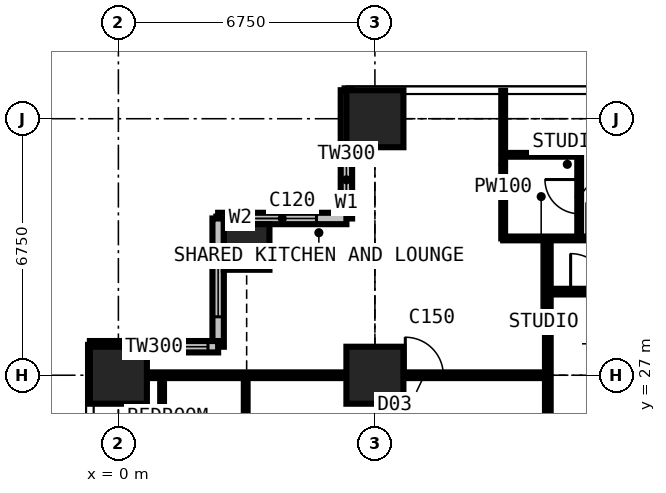
"""IFC4 building model, lengths in metres.
Left out: names, types, materials, properties, quantities, classifications, styles, units other than length and angle.
Written with IfcOpenShell. Run it as: python <this file> out.ifc"""

import sys

from ifc_helpers import new_model, si_unit, direction, frame, frame_2d, origin, origin_2d, place, context, subcontext, project, spatial, rectangle, extrude, element, fill, save


model = new_model("IFC4")
c1 = context("Model", 3, precision=1e-05, world=origin(), true_north=direction((0.0, 1.0)))
c2 = subcontext(c1, "Body", "Model", "MODEL_VIEW")
j1 = project(units=[si_unit("LENGTHUNIT", "METRE"), si_unit("PLANEANGLEUNIT", "RADIAN")], contexts=[c1])
p1 = place(None, origin())
s1 = spatial("IfcSite", under=j1, at=p1, CompositionType="ELEMENT")
p2 = place(p1, origin())
s2 = spatial("IfcBuilding", under=s1, at=p2, CompositionType="ELEMENT")
p3 = place(p2, frame((0.0, 0.0, 153.0)))
s3 = spatial("IfcBuildingStorey", under=s2, at=p3, CompositionType="ELEMENT", Elevation=153.0)
p4 = place(p3, frame((0.0, 27.0, 0.0), z_axis=(0.0, 0.0, 1.0), x_axis=(1.0, 0.0, 0.0)))
e1 = element("IfcColumn", 1, at=p4, inside=s3, PredefinedType="COLUMN", context=c2, shape_type="SweptSolid", body=[
    extrude(rectangle(XDim=1.5, YDim=1.5, at=origin_2d()), origin(), (0.0, 0.0, 1.0), 3.6),
])
p5 = place(p3, frame((3.375, 30.375, 0.0), z_axis=(0.0, 0.0, 1.0), x_axis=(1.0, 0.0, 0.0)))
e2 = element("IfcColumn", 2, at=p5, inside=s3, PredefinedType="COLUMN", context=c2, shape_type="SweptSolid", body=[
    extrude(rectangle(XDim=1.2, YDim=1.2, at=origin_2d()), origin(), (0.0, 0.0, 1.0), 3.6),
])
for number, where, z_axis, x_axis in (
    (3, (6.75, 27.0, 0.0), (0.0, 0.0, 1.0), (1.0, 0.0, 0.0)),
    (4, (6.75, 33.75, 0.0), (0.0, 0.0, 1.0), (1.0, 0.0, 0.0)),
):
    element("IfcColumn", number, at=place(p3, frame(where, z_axis=z_axis, x_axis=x_axis)), inside=s3, PredefinedType="COLUMN", context=c2, shape_type="SweptSolid", body=[
        extrude(rectangle(XDim=1.5, YDim=1.5, at=origin_2d()), origin(), (0.0, 0.0, 1.0), 3.6),
    ])
p6 = place(p3, frame((6.0, 34.5, 0.0), z_axis=(0.0, 0.0, 1.0), x_axis=(0.0, -1.0, 0.0)))
e5 = element("IfcWall", 5, at=p6, inside=s3, PredefinedType="SOLIDWALL", context=c2, shape_type="SweptSolid", body=[
    extrude(rectangle(XDim=3.375, YDim=0.3, at=frame_2d((1.688, 0.0))), origin(), (0.0, 0.0, 1.0), 3.375),
])
p7 = place(p6, frame((1.607, 0.0, 0.9)))
e6 = element("IfcOpeningElement", 6, at=p7, cuts=e5, PredefinedType="OPENING", context=c2, shape_type="SweptSolid", body=[
    extrude(rectangle(XDim=1.5, YDim=1.8, at=frame_2d((0.75, 0.9))), frame((0.0, 0.16, 0.0), z_axis=(0.0, -1.0, 0.0), x_axis=(1.0, 0.0, 0.0)), (0.0, 0.0, 1.0), 0.32),
])
p8 = place(p3, frame((6.0, 31.125, 0.0), z_axis=(0.0, 0.0, 1.0), x_axis=(-1.0, 0.0, 0.0)))
e7 = element("IfcWall", 7, at=p8, inside=s3, PredefinedType="SOLIDWALL", context=c2, shape_type="SweptSolid", body=[
    extrude(rectangle(XDim=3.375, YDim=0.3, at=frame_2d((1.688, 0.0))), origin(), (0.0, 0.0, 1.0), 3.375),
])
p9 = place(p8, frame((0.788, 0.0, 0.6)))
e8 = element("IfcOpeningElement", 8, at=p9, cuts=e7, PredefinedType="OPENING", context=c2, shape_type="SweptSolid", body=[
    extrude(rectangle(XDim=1.8, YDim=2.1, at=frame_2d((0.9, 1.05))), frame((0.0, 0.16, 0.0), z_axis=(0.0, -1.0, 0.0), x_axis=(1.0, 0.0, 0.0)), (0.0, 0.0, 1.0), 0.32),
])
p10 = place(p3, frame((2.625, 31.125, 0.0), z_axis=(0.0, 0.0, 1.0), x_axis=(0.0, -1.0, 0.0)))
e9 = element("IfcWall", 9, at=p10, inside=s3, PredefinedType="SOLIDWALL", context=c2, shape_type="SweptSolid", body=[
    extrude(rectangle(XDim=3.375, YDim=0.3, at=frame_2d((1.688, 0.0))), origin(), (0.0, 0.0, 1.0), 3.375),
])
p11 = place(p10, frame((0.788, 0.0, 0.6)))
e10 = element("IfcOpeningElement", 10, at=p11, cuts=e9, PredefinedType="OPENING", context=c2, shape_type="SweptSolid", body=[
    extrude(rectangle(XDim=1.8, YDim=2.1, at=frame_2d((0.9, 1.05))), frame((0.0, 0.16, 0.0), z_axis=(0.0, -1.0, 0.0), x_axis=(1.0, 0.0, 0.0)), (0.0, 0.0, 1.0), 0.32),
])
p12 = place(p3, frame((2.625, 27.75, 0.0), z_axis=(0.0, 0.0, 1.0), x_axis=(-1.0, 0.0, 0.0)))
e11 = element("IfcWall", 11, at=p12, inside=s3, PredefinedType="SOLIDWALL", context=c2, shape_type="SweptSolid", body=[
    extrude(rectangle(XDim=3.375, YDim=0.3, at=frame_2d((1.688, 0.0))), origin(), (0.0, 0.0, 1.0), 3.375),
])
p13 = place(p12, frame((0.268, 0.0, 0.9)))
e12 = element("IfcOpeningElement", 12, at=p13, cuts=e11, PredefinedType="OPENING", context=c2, shape_type="SweptSolid", body=[
    extrude(rectangle(XDim=1.5, YDim=1.8, at=frame_2d((0.75, 0.9))), frame((0.0, 0.16, 0.0), z_axis=(0.0, -1.0, 0.0), x_axis=(1.0, 0.0, 0.0)), (0.0, 0.0, 1.0), 0.32),
])
p14 = place(p3, frame((-0.734, 27.0, 0.0), z_axis=(0.0, 0.0, 1.0), x_axis=(1.0, 0.0, 0.0)))
e13 = element("IfcWall", 13, at=p14, inside=s3, PredefinedType="PARTITIONING", context=c2, shape_type="SweptSolid", body=[
    extrude(rectangle(XDim=12.034, YDim=0.15, at=frame_2d((6.017, 0.0))), origin(), (0.0, 0.0, 1.0), 2.806),
])
p15 = place(p14, frame((8.284, 0.0, 0.0)))
e14 = element("IfcOpeningElement", 14, at=p15, cuts=e13, PredefinedType="OPENING", context=c2, shape_type="SweptSolid", body=[
    extrude(rectangle(XDim=1.0, YDim=2.2, at=frame_2d((0.5, 1.1))), frame((0.0, 0.085, 0.0), z_axis=(0.0, -1.0, 0.0), x_axis=(1.0, 0.0, 0.0)), (0.0, 0.0, 1.0), 0.17),
])
p16 = place(p3, frame((1.15, 25.0, 0.0), z_axis=(0.0, 0.0, 1.0), x_axis=(0.0, 1.0, 0.0)))
e15 = element("IfcWall", 15, at=p16, inside=s3, PredefinedType="PARTITIONING", context=c2, shape_type="SweptSolid", body=[
    extrude(rectangle(XDim=2.0, YDim=0.1, at=frame_2d((1.0, 0.0))), origin(), (0.0, 0.0, 1.0), 3.375),
])
p17 = place(p3, frame((3.35, 10.125, 0.0), z_axis=(0.0, 0.0, 1.0), x_axis=(0.0, 1.0, 0.0)))
e16 = element("IfcWall", 16, at=p17, inside=s3, PredefinedType="PARTITIONING", context=c2, shape_type="SweptSolid", body=[
    extrude(rectangle(XDim=16.875, YDim=0.1, at=frame_2d((8.438, 0.0))), origin(), (0.0, 0.0, 1.0), 3.375),
])
p18 = place(p17, frame((13.7, 0.0, 0.0)))
e17 = element("IfcOpeningElement", 17, at=p18, cuts=e16, PredefinedType="OPENING", context=c2, shape_type="SweptSolid", body=[
    extrude(rectangle(XDim=0.95, YDim=2.2, at=frame_2d((0.475, 1.1))), frame((0.0, 0.06, 0.0), z_axis=(0.0, -1.0, 0.0), x_axis=(1.0, 0.0, 0.0)), (0.0, 0.0, 1.0), 0.12),
])
p19 = place(p17, frame((4.2, 0.0, 0.0)))
e18 = element("IfcOpeningElement", 18, at=p19, cuts=e16, PredefinedType="OPENING", context=c2, shape_type="SweptSolid", body=[
    extrude(rectangle(XDim=0.95, YDim=2.2, at=frame_2d((0.475, 1.1))), frame((0.0, 0.06, 0.0), z_axis=(0.0, -1.0, 0.0), x_axis=(1.0, 0.0, 0.0)), (0.0, 0.0, 1.0), 0.12),
])
p20 = place(p17, frame((10.95, 0.0, 0.0)))
e19 = element("IfcOpeningElement", 19, at=p20, cuts=e16, PredefinedType="OPENING", context=c2, shape_type="SweptSolid", body=[
    extrude(rectangle(XDim=0.95, YDim=2.2, at=frame_2d((0.475, 1.1))), frame((0.0, 0.06, 0.0), z_axis=(0.0, -1.0, 0.0), x_axis=(1.0, 0.0, 0.0)), (0.0, 0.0, 1.0), 0.12),
])
p21 = place(p3, frame((10.125, 30.6, 0.0), z_axis=(0.0, 0.0, 1.0), x_axis=(0.0, 1.0, 0.0)))
e20 = element("IfcWall", 20, at=p21, inside=s3, PredefinedType="PARTITIONING", context=c2, shape_type="SweptSolid", body=[
    extrude(rectangle(XDim=3.884, YDim=0.1, at=frame_2d((1.942, 0.0))), origin(), (0.0, 0.0, 1.0), 3.375),
])
p22 = place(p3, frame((10.125, 30.6, 0.0), z_axis=(0.0, 0.0, 1.0), x_axis=(1.0, 0.0, 0.0)))
e21 = element("IfcWall", 21, at=p22, inside=s3, PredefinedType="PARTITIONING", context=c2, shape_type="SweptSolid", body=[
    extrude(rectangle(XDim=3.375, YDim=0.1, at=frame_2d((1.688, 0.0))), origin(), (0.0, 0.0, 1.0), 3.375),
])
p23 = place(p22, frame((2.2, 0.0, 0.0)))
e22 = element("IfcOpeningElement", 22, at=p23, cuts=e21, PredefinedType="OPENING", context=c2, shape_type="SweptSolid", body=[
    extrude(rectangle(XDim=0.95, YDim=2.2, at=frame_2d((0.475, 1.1))), frame((0.0, 0.06, 0.0), z_axis=(0.0, -1.0, 0.0), x_axis=(1.0, 0.0, 0.0)), (0.0, 0.0, 1.0), 0.12),
])
p24 = place(p3, frame((10.125, 32.8, 0.0), z_axis=(0.0, 0.0, 1.0), x_axis=(1.0, 0.0, 0.0)))
e23 = element("IfcWall", 23, at=p24, inside=s3, PredefinedType="PARTITIONING", context=c2, shape_type="SweptSolid", body=[
    extrude(rectangle(XDim=2.0, YDim=0.1, at=frame_2d((1.0, 0.0))), origin(), (0.0, 0.0, 1.0), 3.375),
])
p25 = place(p3, frame((11.3, 11.3, 0.0), z_axis=(0.0, 0.0, 1.0), x_axis=(0.0, 1.0, 0.0)))
e24 = element("IfcWall", 24, at=p25, inside=s3, PredefinedType="PARTITIONING", context=c2, shape_type="SweptSolid", body=[
    extrude(rectangle(XDim=19.3, YDim=0.15, at=frame_2d((9.65, 0.0))), origin(), (0.0, 0.0, 1.0), 3.375),
])
p26 = place(p25, frame((13.525, 0.0, 0.0)))
e25 = element("IfcOpeningElement", 25, at=p26, cuts=e24, PredefinedType="OPENING", context=c2, shape_type="SweptSolid", body=[
    extrude(rectangle(XDim=1.0, YDim=2.2, at=frame_2d((0.5, 1.1))), frame((0.0, 0.085, 0.0), z_axis=(0.0, -1.0, 0.0), x_axis=(1.0, 0.0, 0.0)), (0.0, 0.0, 1.0), 0.17),
])
p27 = place(p25, frame((10.438, 0.0, 0.0)))
e26 = element("IfcOpeningElement", 26, at=p27, cuts=e24, PredefinedType="OPENING", context=c2, shape_type="SweptSolid", body=[
    extrude(rectangle(XDim=1.0, YDim=2.2, at=frame_2d((0.5, 1.1))), frame((0.0, 0.085, 0.0), z_axis=(0.0, -1.0, 0.0), x_axis=(1.0, 0.0, 0.0)), (0.0, 0.0, 1.0), 0.17),
])
p28 = place(p3, frame((11.3, 29.2, 0.0), z_axis=(0.0, 0.0, 1.0), x_axis=(1.0, 0.0, 0.0)))
e27 = element("IfcWall", 27, at=p28, inside=s3, PredefinedType="PARTITIONING", context=c2, shape_type="SweptSolid", body=[
    extrude(rectangle(XDim=19.809, YDim=0.15, at=frame_2d((9.904, 0.0))), origin(), (0.0, 0.0, 1.0), 3.375),
])
p29 = place(p28, frame((12.9, 0.0, 0.0)))
e28 = element("IfcOpeningElement", 28, at=p29, cuts=e27, PredefinedType="OPENING", context=c2, shape_type="SweptSolid", body=[
    extrude(rectangle(XDim=1.0, YDim=2.2, at=frame_2d((0.5, 1.1))), frame((0.0, 0.085, 0.0), z_axis=(0.0, -1.0, 0.0), x_axis=(1.0, 0.0, 0.0)), (0.0, 0.0, 1.0), 0.17),
])
p30 = place(p28, frame((5.825, 0.0, 0.0)))
e29 = element("IfcOpeningElement", 29, at=p30, cuts=e27, PredefinedType="OPENING", context=c2, shape_type="SweptSolid", body=[
    extrude(rectangle(XDim=0.95, YDim=2.2, at=frame_2d((0.475, 1.1))), frame((0.0, 0.085, 0.0), z_axis=(0.0, -1.0, 0.0), x_axis=(1.0, 0.0, 0.0)), (0.0, 0.0, 1.0), 0.17),
])
p31 = place(p28, frame((0.6, 0.0, 0.0)))
e30 = element("IfcOpeningElement", 30, at=p31, cuts=e27, PredefinedType="OPENING", context=c2, shape_type="SweptSolid", body=[
    extrude(rectangle(XDim=1.0, YDim=2.2, at=frame_2d((0.5, 1.1))), frame((0.0, 0.085, 0.0), z_axis=(0.0, -1.0, 0.0), x_axis=(1.0, 0.0, 0.0)), (0.0, 0.0, 1.0), 0.17),
])
p32 = place(p3, frame((12.125, 30.6, 0.0), z_axis=(0.0, 0.0, 1.0), x_axis=(0.0, 1.0, 0.0)))
e31 = element("IfcWall", 31, at=p32, inside=s3, PredefinedType="PARTITIONING", context=c2, shape_type="SweptSolid", body=[
    extrude(rectangle(XDim=2.2, YDim=0.1, at=frame_2d((1.1, 0.0))), origin(), (0.0, 0.0, 1.0), 3.375),
])
p33 = place(p32, frame((0.65, 0.0, 0.0)))
e32 = element("IfcOpeningElement", 32, at=p33, cuts=e31, PredefinedType="OPENING", context=c2, shape_type="SweptSolid", body=[
    extrude(rectangle(XDim=0.9, YDim=2.2, at=frame_2d((0.45, 1.1))), frame((0.0, 0.06, 0.0), z_axis=(0.0, -1.0, 0.0), x_axis=(1.0, 0.0, 0.0)), (0.0, 0.0, 1.0), 0.12),
])
p34 = place(p7, origin())
e33 = element("IfcWindow", 33, at=p34, inside=s3, PartitioningType="SINGLE_PANEL", PredefinedType="WINDOW", context=c2, shape_type="SweptSolid", body=[
    extrude(rectangle(XDim=1.5, YDim=1.8, at=frame_2d((0.75, 0.9))), frame((0.0, 0.03, 0.0), z_axis=(0.0, -1.0, 0.0), x_axis=(1.0, 0.0, 0.0)), (0.0, 0.0, 1.0), 0.06),
])
fill(e6, e33)
p35 = place(p9, origin())
e34 = element("IfcWindow", 34, at=p35, inside=s3, PartitioningType="SINGLE_PANEL", PredefinedType="WINDOW", context=c2, shape_type="SweptSolid", body=[
    extrude(rectangle(XDim=1.8, YDim=2.1, at=frame_2d((0.9, 1.05))), frame((0.0, 0.03, 0.0), z_axis=(0.0, -1.0, 0.0), x_axis=(1.0, 0.0, 0.0)), (0.0, 0.0, 1.0), 0.06),
])
fill(e8, e34)
p36 = place(p11, origin())
e35 = element("IfcWindow", 35, at=p36, inside=s3, PartitioningType="SINGLE_PANEL", PredefinedType="WINDOW", context=c2, shape_type="SweptSolid", body=[
    extrude(rectangle(XDim=1.8, YDim=2.1, at=frame_2d((0.9, 1.05))), frame((0.0, 0.03, 0.0), z_axis=(0.0, -1.0, 0.0), x_axis=(1.0, 0.0, 0.0)), (0.0, 0.0, 1.0), 0.06),
])
fill(e10, e35)
p37 = place(p13, origin())
e36 = element("IfcWindow", 36, at=p37, inside=s3, PartitioningType="SINGLE_PANEL", PredefinedType="WINDOW", context=c2, shape_type="SweptSolid", body=[
    extrude(rectangle(XDim=1.5, YDim=1.8, at=frame_2d((0.75, 0.9))), frame((0.0, 0.03, 0.0), z_axis=(0.0, -1.0, 0.0), x_axis=(1.0, 0.0, 0.0)), (0.0, 0.0, 1.0), 0.06),
])
fill(e12, e36)
p38 = place(p33, origin())
e37 = element("IfcDoor", 37, at=p38, inside=s3, OperationType="SINGLE_SWING_RIGHT", PredefinedType="DOOR", context=c2, shape_type="SweptSolid", body=[
    extrude(rectangle(XDim=0.9, YDim=2.2, at=frame_2d((0.45, 1.1))), frame((0.0, 0.025, 0.0), z_axis=(0.0, -1.0, 0.0), x_axis=(1.0, 0.0, 0.0)), (0.0, 0.0, 1.0), 0.05),
])
fill(e32, e37)
p39 = place(p31, origin())
e38 = element("IfcDoor", 38, at=p39, inside=s3, OperationType="SINGLE_SWING_LEFT", PredefinedType="DOOR", context=c2, shape_type="SweptSolid", body=[
    extrude(rectangle(XDim=1.0, YDim=2.2, at=frame_2d((0.5, 1.1))), frame((0.0, 0.025, 0.0), z_axis=(0.0, -1.0, 0.0), x_axis=(1.0, 0.0, 0.0)), (0.0, 0.0, 1.0), 0.05),
])
fill(e30, e38)
p40 = place(p15, origin())
e39 = element("IfcDoor", 39, at=p40, inside=s3, OperationType="SINGLE_SWING_LEFT", PredefinedType="DOOR", context=c2, shape_type="SweptSolid", body=[
    extrude(rectangle(XDim=1.0, YDim=2.2, at=frame_2d((0.5, 1.1))), frame((0.0, 0.025, 0.0), z_axis=(0.0, -1.0, 0.0), x_axis=(1.0, 0.0, 0.0)), (0.0, 0.0, 1.0), 0.05),
])
fill(e14, e39)
save(model, sys.argv[1])
